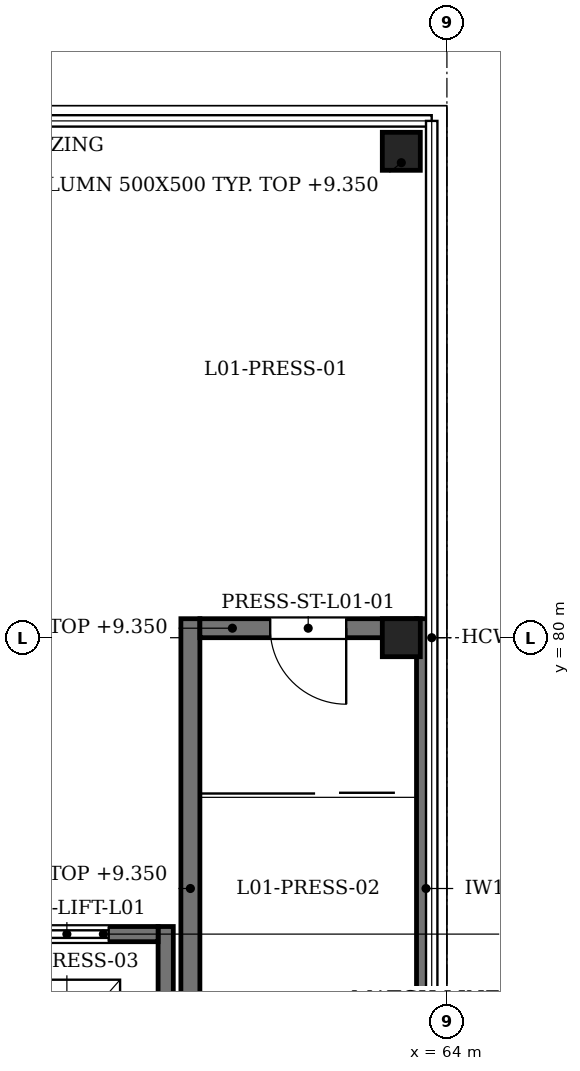
"""IFC4 building model, lengths in metres.
Left out: names, types, materials, properties, quantities, classifications, styles, units other than length and angle.
Written with IfcOpenShell. Run it as: python <this file> out.ifc"""

import sys

from ifc_helpers import new_model, si_unit, direction, frame, frame_2d, origin, origin_2d, place, context, subcontext, project, spatial, rectangle, extrude, element, fill, save


model = new_model("IFC4")
c1 = context("Model", 3, precision=1e-05, world=origin(), true_north=direction((0.0, 1.0)))
c2 = subcontext(c1, "Body", "Model", "MODEL_VIEW")
j1 = project(units=[si_unit("LENGTHUNIT", "METRE"), si_unit("PLANEANGLEUNIT", "RADIAN")], contexts=[c1])
p1 = place(None, origin())
s1 = spatial("IfcSite", under=j1, at=p1, CompositionType="ELEMENT")
p2 = place(p1, origin())
s2 = spatial("IfcBuilding", under=s1, at=p2, CompositionType="ELEMENT")
p3 = place(p2, frame((0.0, 0.0, 4.8)))
s3 = spatial("IfcBuildingStorey", under=s2, at=p3, CompositionType="ELEMENT", Elevation=4.8)
for number, where, z_axis, x_axis in (
    (1, (63.4, 80.0, 0.0), (0.0, 0.0, 1.0), (1.0, 0.0, 0.0)),
    (2, (63.4, 86.4, 0.0), (0.0, 0.0, 1.0), (1.0, 0.0, 0.0)),
):
    element("IfcColumn", number, at=place(p3, frame(where, z_axis=z_axis, x_axis=x_axis)), inside=s3, PredefinedType="COLUMN", context=c2, shape_type="SweptSolid", body=[
        extrude(rectangle(XDim=0.5, YDim=0.5, at=origin_2d()), origin(), (0.0, 0.0, 1.0), 4.55),
    ])
for number, where, z_axis, x_axis in (
    (3, (60.625, 73.15, 0.0), (0.0, 0.0, 1.0), (0.0, 1.0, 0.0)),
    (4, (63.725, 73.15, 0.0), (0.0, 0.0, 1.0), (0.0, 1.0, 0.0)),
):
    element("IfcWall", number, at=place(p3, frame(where, z_axis=z_axis, x_axis=x_axis)), inside=s3, PredefinedType="SOLIDWALL", context=c2, shape_type="SweptSolid", body=[
        extrude(rectangle(XDim=7.1, YDim=0.25, at=frame_2d((3.55, 0.0))), origin(), (0.0, 0.0, 1.0), 4.55),
    ])
p4 = place(p3, frame((60.75, 80.125, 0.0), z_axis=(0.0, 0.0, 1.0), x_axis=(1.0, 0.0, 0.0)))
e5 = element("IfcWall", 5, at=p4, inside=s3, PredefinedType="SOLIDWALL", context=c2, shape_type="SweptSolid", body=[
    extrude(rectangle(XDim=2.85, YDim=0.25, at=frame_2d((1.425, 0.0))), origin(), (0.0, 0.0, 1.0), 4.55),
])
p5 = place(p4, frame((0.925, 0.0, 0.0)))
e6 = element("IfcOpeningElement", 6, at=p5, cuts=e5, PredefinedType="OPENING", context=c2, shape_type="SweptSolid", body=[
    extrude(rectangle(XDim=1.0, YDim=2.1, at=frame_2d((0.5, 1.05))), frame((0.0, 0.135, 0.0), z_axis=(0.0, -1.0, 0.0), x_axis=(1.0, 0.0, 0.0)), (0.0, 0.0, 1.0), 0.27),
])
p6 = place(p3, frame((60.3, 73.2, 0.0), z_axis=(0.0, 0.0, 1.0), x_axis=(0.0, 1.0, 0.0)))
e7 = element("IfcWall", 7, at=p6, inside=s3, PredefinedType="SOLIDWALL", context=c2, shape_type="SweptSolid", body=[
    extrude(rectangle(XDim=3.0, YDim=0.2, at=frame_2d((1.5, 0.0))), origin(), (0.0, 0.0, 1.0), 4.18),
])
p7 = place(p3, frame((57.8, 76.1, 0.0), z_axis=(0.0, 0.0, 1.0), x_axis=(1.0, 0.0, 0.0)))
e8 = element("IfcWall", 8, at=p7, inside=s3, PredefinedType="SOLIDWALL", context=c2, shape_type="SweptSolid", body=[
    extrude(rectangle(XDim=2.4, YDim=0.2, at=frame_2d((1.2, 0.0))), origin(), (0.0, 0.0, 1.0), 4.55),
])
p8 = place(p7, frame((0.65, 0.0, 0.0)))
e9 = element("IfcOpeningElement", 9, at=p8, cuts=e8, PredefinedType="OPENING", context=c2, shape_type="SweptSolid", body=[
    extrude(rectangle(XDim=1.1, YDim=2.1, at=frame_2d((0.55, 1.05))), frame((0.0, 0.11, 0.0), z_axis=(0.0, -1.0, 0.0), x_axis=(1.0, 0.0, 0.0)), (0.0, 0.0, 1.0), 0.22),
])
p9 = place(p5, origin())
e10 = element("IfcDoor", 10, at=p9, inside=s3, OperationType="SINGLE_SWING_RIGHT", PredefinedType="DOOR", context=c2, shape_type="SweptSolid", body=[
    extrude(rectangle(XDim=1.0, YDim=2.1, at=frame_2d((0.5, 1.05))), frame((0.0, 0.025, 0.0), z_axis=(0.0, -1.0, 0.0), x_axis=(1.0, 0.0, 0.0)), (0.0, 0.0, 1.0), 0.05),
])
fill(e6, e10)
p10 = place(p8, origin())
e11 = element("IfcDoor", 11, at=p10, inside=s3, OperationType="DOUBLE_DOOR_SLIDING", PredefinedType="DOOR", context=c2, shape_type="SweptSolid", body=[
    extrude(rectangle(XDim=1.1, YDim=2.1, at=frame_2d((0.55, 1.05))), frame((0.0, 0.025, 0.0), z_axis=(0.0, -1.0, 0.0), x_axis=(1.0, 0.0, 0.0)), (0.0, 0.0, 1.0), 0.05),
])
fill(e9, e11)
save(model, sys.argv[1])
